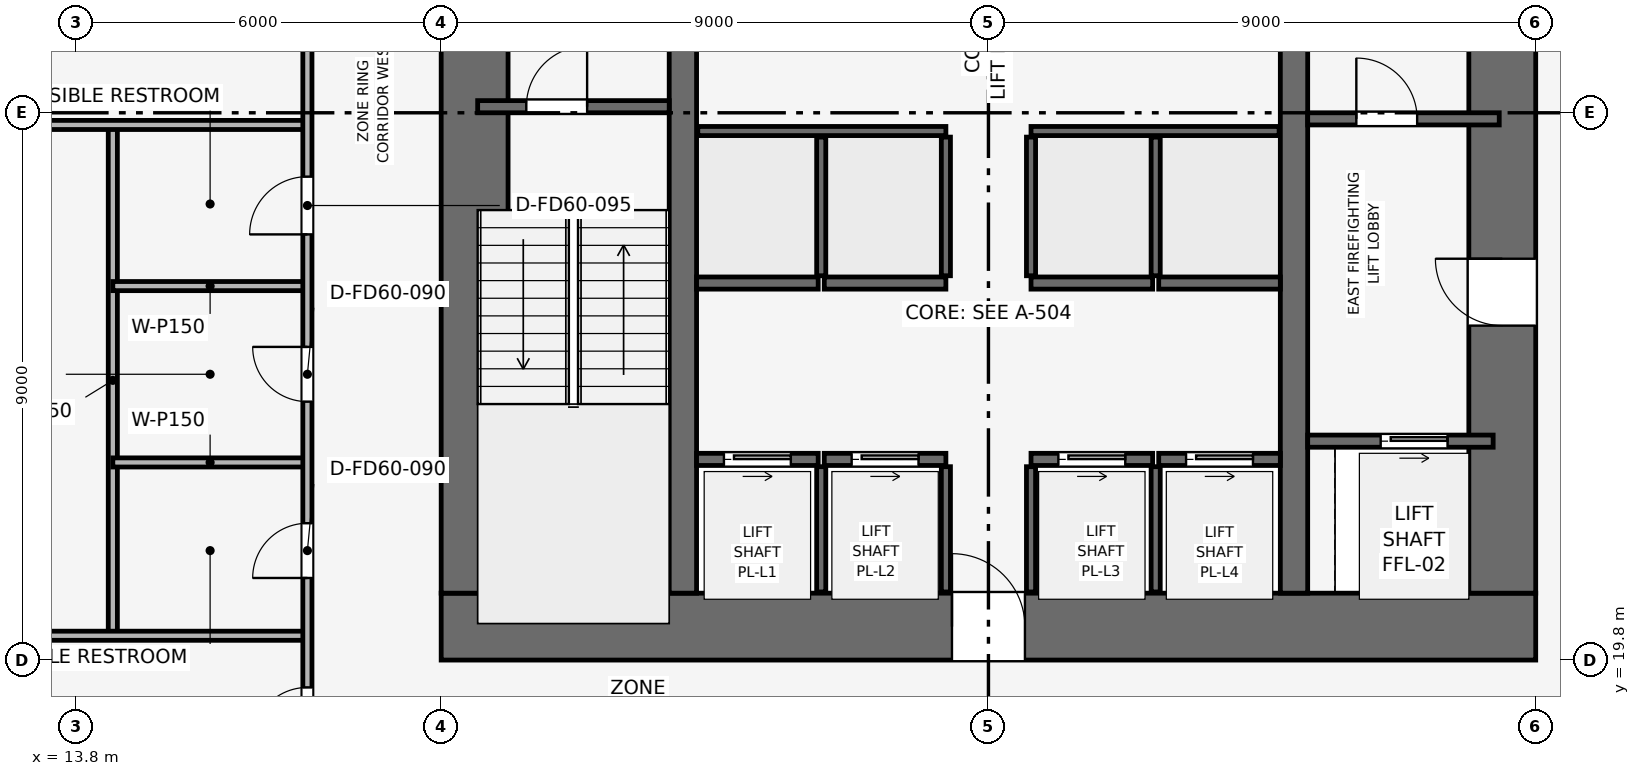
"""IFC4 building model, lengths in metres.
Left out: names, types, materials, properties, quantities, classifications, styles, units other than length and angle.
Written with IfcOpenShell. Run it as: python <this file> out.ifc"""

import sys

from ifc_helpers import new_model, si_unit, direction, frame, frame_2d, origin, place, context, subcontext, project, spatial, rectangle, extrude, element, fill, save


model = new_model("IFC4")
c1 = context("Model", 3, precision=1e-05, world=origin(), true_north=direction((0.0, 1.0)))
c2 = subcontext(c1, "Body", "Model", "MODEL_VIEW")
j1 = project(units=[si_unit("LENGTHUNIT", "METRE"), si_unit("PLANEANGLEUNIT", "RADIAN")], contexts=[c1])
p1 = place(None, origin())
s1 = spatial("IfcSite", under=j1, at=p1, CompositionType="ELEMENT")
p2 = place(p1, origin())
s2 = spatial("IfcBuilding", under=s1, at=p2, CompositionType="ELEMENT")
p3 = place(p2, frame((0.0, 0.0, 57.3)))
s3 = spatial("IfcBuildingStorey", under=s2, at=p3, CompositionType="ELEMENT", Elevation=57.3)
p4 = place(p3, frame((19.8, 20.35, 0.0), z_axis=(0.0, 0.0, 1.0), x_axis=(1.0, 0.0, 0.0)))
e1 = element("IfcWall", 1, at=p4, inside=s3, PredefinedType="SHEAR", context=c2, shape_type="SweptSolid", body=[
    extrude(rectangle(XDim=18.0, YDim=1.1, at=frame_2d((9.0, 0.0))), origin(), (0.0, 0.0, 1.0), 3.9),
])
p5 = place(p4, frame((8.4, 0.0, 0.0)))
e2 = element("IfcOpeningElement", 2, at=p5, cuts=e1, PredefinedType="OPENING", context=c2, shape_type="SweptSolid", body=[
    extrude(rectangle(XDim=1.2, YDim=2.2, at=frame_2d((0.6, 1.1))), frame((0.0, 0.56, 0.0), z_axis=(0.0, -1.0, 0.0), x_axis=(1.0, 0.0, 0.0)), (0.0, 0.0, 1.0), 1.12),
])
p6 = place(p3, frame((20.35, 20.9, 0.0), z_axis=(0.0, 0.0, 1.0), x_axis=(0.0, 1.0, 0.0)))
e3 = element("IfcWall", 3, at=p6, inside=s3, PredefinedType="SHEAR", context=c2, shape_type="SweptSolid", body=[
    extrude(rectangle(XDim=15.8, YDim=1.1, at=frame_2d((7.9, 0.0))), origin(), (0.0, 0.0, 1.0), 3.9),
])
p7 = place(p6, frame((9.9, 0.0, 0.0)))
e4 = element("IfcOpeningElement", 4, at=p7, cuts=e3, PredefinedType="OPENING", context=c2, shape_type="SweptSolid", body=[
    extrude(rectangle(XDim=1.1, YDim=2.15, at=frame_2d((0.55, 1.075))), frame((0.0, 0.56, 0.0), z_axis=(0.0, -1.0, 0.0), x_axis=(1.0, 0.0, 0.0)), (0.0, 0.0, 1.0), 1.12),
])
p8 = place(p3, frame((37.25, 20.9, 0.0), z_axis=(0.0, 0.0, 1.0), x_axis=(0.0, 1.0, 0.0)))
e5 = element("IfcWall", 5, at=p8, inside=s3, PredefinedType="SHEAR", context=c2, shape_type="SweptSolid", body=[
    extrude(rectangle(XDim=15.8, YDim=1.1, at=frame_2d((7.9, 0.0))), origin(), (0.0, 0.0, 1.0), 3.9),
])
p9 = place(p8, frame((4.4, 0.0, 0.0)))
e6 = element("IfcOpeningElement", 6, at=p9, cuts=e5, PredefinedType="OPENING", context=c2, shape_type="SweptSolid", body=[
    extrude(rectangle(XDim=1.1, YDim=2.15, at=frame_2d((0.55, 1.075))), frame((0.0, 0.56, 0.0), z_axis=(0.0, -1.0, 0.0), x_axis=(1.0, 0.0, 0.0)), (0.0, 0.0, 1.0), 1.12),
])
for number, where, z_axis, x_axis in (
    (7, (23.775, 20.9, 0.0), (0.0, 0.0, 1.0), (0.0, 1.0, 0.0)),
    (8, (33.825, 20.9, 0.0), (0.0, 0.0, 1.0), (0.0, 1.0, 0.0)),
):
    element("IfcWall", number, at=place(p3, frame(where, z_axis=z_axis, x_axis=x_axis)), inside=s3, PredefinedType="SHEAR", context=c2, shape_type="SweptSolid", body=[
        extrude(rectangle(XDim=15.8, YDim=0.45, at=frame_2d((7.9, 0.0))), origin(), (0.0, 0.0, 1.0), 3.9),
    ])
p10 = place(p3, frame((20.4, 28.9, 0.0), z_axis=(0.0, 0.0, 1.0), x_axis=(1.0, 0.0, 0.0)))
e9 = element("IfcWall", 9, at=p10, inside=s3, PredefinedType="SHEAR", context=c2, shape_type="SweptSolid", body=[
    extrude(rectangle(XDim=3.15, YDim=0.2, at=frame_2d((1.575, 0.0))), origin(), (0.0, 0.0, 1.0), 3.65),
])
p11 = place(p10, frame((0.8, 0.0, 0.0)))
e10 = element("IfcOpeningElement", 10, at=p11, cuts=e9, PredefinedType="OPENING", context=c2, shape_type="SweptSolid", body=[
    extrude(rectangle(XDim=1.0, YDim=2.1, at=frame_2d((0.5, 1.05))), frame((0.0, 0.11, 0.0), z_axis=(0.0, -1.0, 0.0), x_axis=(1.0, 0.0, 0.0)), (0.0, 0.0, 1.0), 0.22),
])
p12 = place(p3, frame((34.05, 28.7, 0.0), z_axis=(0.0, 0.0, 1.0), x_axis=(1.0, 0.0, 0.0)))
e11 = element("IfcWall", 11, at=p12, inside=s3, PredefinedType="SHEAR", context=c2, shape_type="SweptSolid", body=[
    extrude(rectangle(XDim=3.15, YDim=0.2, at=frame_2d((1.575, 0.0))), origin(), (0.0, 0.0, 1.0), 3.65),
])
p13 = place(p12, frame((0.8, 0.0, 0.0)))
e12 = element("IfcOpeningElement", 12, at=p13, cuts=e11, PredefinedType="OPENING", context=c2, shape_type="SweptSolid", body=[
    extrude(rectangle(XDim=1.0, YDim=2.1, at=frame_2d((0.5, 1.05))), frame((0.0, 0.11, 0.0), z_axis=(0.0, -1.0, 0.0), x_axis=(1.0, 0.0, 0.0)), (0.0, 0.0, 1.0), 0.22),
])
p14 = place(p3, frame((34.05, 23.4, 0.0), z_axis=(0.0, 0.0, 1.0), x_axis=(1.0, 0.0, 0.0)))
e13 = element("IfcWall", 13, at=p14, inside=s3, PredefinedType="SHEAR", context=c2, shape_type="SweptSolid", body=[
    extrude(rectangle(XDim=3.05, YDim=0.2, at=frame_2d((1.525, 0.0))), origin(), (0.0, 0.0, 1.0), 3.65),
])
p15 = place(p14, frame((1.2, 0.0, 0.0)))
e14 = element("IfcOpeningElement", 14, at=p15, cuts=e13, PredefinedType="OPENING", context=c2, shape_type="SweptSolid", body=[
    extrude(rectangle(XDim=1.1, YDim=2.15, at=frame_2d((0.55, 1.075))), frame((0.0, 0.11, 0.0), z_axis=(0.0, -1.0, 0.0), x_axis=(1.0, 0.0, 0.0)), (0.0, 0.0, 1.0), 0.22),
])
p16 = place(p3, frame((24.0, 23.1, 0.0), z_axis=(0.0, 0.0, 1.0), x_axis=(1.0, 0.0, 0.0)))
e15 = element("IfcWall", 15, at=p16, inside=s3, PredefinedType="SHEAR", context=c2, shape_type="SweptSolid", body=[
    extrude(rectangle(XDim=2.0, YDim=0.2, at=frame_2d((1.0, 0.0))), origin(), (0.0, 0.0, 1.0), 3.65),
])
p17 = place(p16, frame((0.45, 0.0, 0.0)))
e16 = element("IfcOpeningElement", 16, at=p17, cuts=e15, PredefinedType="OPENING", context=c2, shape_type="SweptSolid", body=[
    extrude(rectangle(XDim=1.1, YDim=2.15, at=frame_2d((0.55, 1.075))), frame((0.0, 0.11, 0.0), z_axis=(0.0, -1.0, 0.0), x_axis=(1.0, 0.0, 0.0)), (0.0, 0.0, 1.0), 0.22),
])
p18 = place(p3, frame((26.1, 23.1, 0.0), z_axis=(0.0, 0.0, 1.0), x_axis=(1.0, 0.0, 0.0)))
e17 = element("IfcWall", 17, at=p18, inside=s3, PredefinedType="SHEAR", context=c2, shape_type="SweptSolid", body=[
    extrude(rectangle(XDim=2.0, YDim=0.2, at=frame_2d((1.0, 0.0))), origin(), (0.0, 0.0, 1.0), 3.65),
])
p19 = place(p18, frame((0.45, 0.0, 0.0)))
e18 = element("IfcOpeningElement", 18, at=p19, cuts=e17, PredefinedType="OPENING", context=c2, shape_type="SweptSolid", body=[
    extrude(rectangle(XDim=1.1, YDim=2.15, at=frame_2d((0.55, 1.075))), frame((0.0, 0.11, 0.0), z_axis=(0.0, -1.0, 0.0), x_axis=(1.0, 0.0, 0.0)), (0.0, 0.0, 1.0), 0.22),
])
p20 = place(p3, frame((29.5, 23.1, 0.0), z_axis=(0.0, 0.0, 1.0), x_axis=(1.0, 0.0, 0.0)))
e19 = element("IfcWall", 19, at=p20, inside=s3, PredefinedType="SHEAR", context=c2, shape_type="SweptSolid", body=[
    extrude(rectangle(XDim=2.0, YDim=0.2, at=frame_2d((1.0, 0.0))), origin(), (0.0, 0.0, 1.0), 3.65),
])
p21 = place(p20, frame((0.45, 0.0, 0.0)))
e20 = element("IfcOpeningElement", 20, at=p21, cuts=e19, PredefinedType="OPENING", context=c2, shape_type="SweptSolid", body=[
    extrude(rectangle(XDim=1.1, YDim=2.15, at=frame_2d((0.55, 1.075))), frame((0.0, 0.11, 0.0), z_axis=(0.0, -1.0, 0.0), x_axis=(1.0, 0.0, 0.0)), (0.0, 0.0, 1.0), 0.22),
])
p22 = place(p3, frame((31.6, 23.1, 0.0), z_axis=(0.0, 0.0, 1.0), x_axis=(1.0, 0.0, 0.0)))
e21 = element("IfcWall", 21, at=p22, inside=s3, PredefinedType="SHEAR", context=c2, shape_type="SweptSolid", body=[
    extrude(rectangle(XDim=2.0, YDim=0.2, at=frame_2d((1.0, 0.0))), origin(), (0.0, 0.0, 1.0), 3.65),
])
p23 = place(p22, frame((0.45, 0.0, 0.0)))
e22 = element("IfcOpeningElement", 22, at=p23, cuts=e21, PredefinedType="OPENING", context=c2, shape_type="SweptSolid", body=[
    extrude(rectangle(XDim=1.1, YDim=2.15, at=frame_2d((0.55, 1.075))), frame((0.0, 0.11, 0.0), z_axis=(0.0, -1.0, 0.0), x_axis=(1.0, 0.0, 0.0)), (0.0, 0.0, 1.0), 0.22),
])
for number, where, z_axis, x_axis in (
    (23, (24.0, 26.0, 0.0), (0.0, 0.0, 1.0), (1.0, 0.0, 0.0)),
    (24, (26.1, 26.0, 0.0), (0.0, 0.0, 1.0), (1.0, 0.0, 0.0)),
    (25, (29.5, 26.0, 0.0), (0.0, 0.0, 1.0), (1.0, 0.0, 0.0)),
    (26, (31.6, 26.0, 0.0), (0.0, 0.0, 1.0), (1.0, 0.0, 0.0)),
):
    element("IfcWall", number, at=place(p3, frame(where, z_axis=z_axis, x_axis=x_axis)), inside=s3, PredefinedType="SHEAR", context=c2, shape_type="SweptSolid", body=[
        extrude(rectangle(XDim=2.0, YDim=0.2, at=frame_2d((1.0, 0.0))), origin(), (0.0, 0.0, 1.0), 3.65),
    ])
for number, where, z_axis, x_axis in (
    (27, (26.05, 20.92, 0.0), (0.0, 0.0, 1.0), (0.0, 1.0, 0.0)),
    (28, (28.1, 20.92, 0.0), (0.0, 0.0, 1.0), (0.0, 1.0, 0.0)),
    (29, (29.5, 20.92, 0.0), (0.0, 0.0, 1.0), (0.0, 1.0, 0.0)),
    (30, (31.55, 20.92, 0.0), (0.0, 0.0, 1.0), (0.0, 1.0, 0.0)),
):
    element("IfcWall", number, at=place(p3, frame(where, z_axis=z_axis, x_axis=x_axis)), inside=s3, PredefinedType="SHEAR", context=c2, shape_type="SweptSolid", body=[
        extrude(rectangle(XDim=2.06, YDim=0.15, at=frame_2d((1.03, 0.0))), origin(), (0.0, 0.0, 1.0), 3.65),
    ])
for number, where, z_axis, x_axis in (
    (31, (24.02, 28.5, 0.0), (0.0, 0.0, 1.0), (1.0, 0.0, 0.0)),
    (32, (29.5, 28.5, 0.0), (0.0, 0.0, 1.0), (1.0, 0.0, 0.0)),
):
    element("IfcWall", number, at=place(p3, frame(where, z_axis=z_axis, x_axis=x_axis)), inside=s3, PredefinedType="SHEAR", context=c2, shape_type="SweptSolid", body=[
        extrude(rectangle(XDim=4.08, YDim=0.15, at=frame_2d((2.04, 0.0))), origin(), (0.0, 0.0, 1.0), 3.65),
    ])
for number, where, z_axis, x_axis in (
    (33, (26.05, 26.12, 0.0), (0.0, 0.0, 1.0), (0.0, 1.0, 0.0)),
    (34, (28.1, 26.12, 0.0), (0.0, 0.0, 1.0), (0.0, 1.0, 0.0)),
    (35, (29.5, 26.12, 0.0), (0.0, 0.0, 1.0), (0.0, 1.0, 0.0)),
    (36, (31.55, 26.12, 0.0), (0.0, 0.0, 1.0), (0.0, 1.0, 0.0)),
):
    element("IfcWall", number, at=place(p3, frame(where, z_axis=z_axis, x_axis=x_axis)), inside=s3, PredefinedType="SHEAR", context=c2, shape_type="SweptSolid", body=[
        extrude(rectangle(XDim=2.28, YDim=0.15, at=frame_2d((1.14, 0.0))), origin(), (0.0, 0.0, 1.0), 3.65),
    ])
p24 = place(p3, frame((14.4, 20.2, 0.0), z_axis=(0.0, 0.0, 1.0), x_axis=(0.0, 1.0, 0.0)))
e37 = element("IfcWall", 37, at=p24, inside=s3, PredefinedType="PARTITIONING", context=c2, shape_type="SweptSolid", body=[
    extrude(rectangle(XDim=8.4, YDim=0.15, at=frame_2d((4.2, 0.0))), origin(), (0.0, 0.0, 1.0), 3.085),
])
p25 = place(p3, frame((1.03, 20.2, 0.0), z_axis=(0.0, 0.0, 1.0), x_axis=(1.0, 0.0, 0.0)))
e38 = element("IfcWall", 38, at=p25, inside=s3, PredefinedType="PARTITIONING", context=c2, shape_type="SweptSolid", body=[
    extrude(rectangle(XDim=16.57, YDim=0.15, at=frame_2d((8.285, 0.0))), origin(), (0.0, 0.0, 1.0), 2.935),
])
p26 = place(p25, frame((6.235, 0.0, 0.0)))
e39 = element("IfcOpeningElement", 39, at=p26, cuts=e38, PredefinedType="OPENING", context=c2, shape_type="SweptSolid", body=[
    extrude(rectangle(XDim=0.9, YDim=2.1, at=frame_2d((0.45, 1.05))), frame((0.0, 0.085, 0.0), z_axis=(0.0, -1.0, 0.0), x_axis=(1.0, 0.0, 0.0)), (0.0, 0.0, 1.0), 0.17),
])
p27 = place(p3, frame((1.03, 28.6, 0.0), z_axis=(0.0, 0.0, 1.0), x_axis=(1.0, 0.0, 0.0)))
e40 = element("IfcWall", 40, at=p27, inside=s3, PredefinedType="PARTITIONING", context=c2, shape_type="SweptSolid", body=[
    extrude(rectangle(XDim=16.57, YDim=0.15, at=frame_2d((8.285, 0.0))), origin(), (0.0, 0.0, 1.0), 2.935),
])
for number, where, z_axis, x_axis in (
    (41, (14.4, 23.05, 0.0), (0.0, 0.0, 1.0), (1.0, 0.0, 0.0)),
    (42, (14.4, 25.95, 0.0), (0.0, 0.0, 1.0), (1.0, 0.0, 0.0)),
):
    element("IfcWall", number, at=place(p3, frame(where, z_axis=z_axis, x_axis=x_axis)), inside=s3, PredefinedType="PARTITIONING", context=c2, shape_type="SweptSolid", body=[
        extrude(rectangle(XDim=3.2, YDim=0.15, at=frame_2d((1.6, 0.0))), origin(), (0.0, 0.0, 1.0), 3.65),
    ])
p28 = place(p3, frame((17.6, 17.6, 0.0), z_axis=(0.0, 0.0, 1.0), x_axis=(0.0, 1.0, 0.0)))
e43 = element("IfcWall", 43, at=p28, inside=s3, PredefinedType="PARTITIONING", context=c2, shape_type="SweptSolid", body=[
    extrude(rectangle(XDim=22.4, YDim=0.15, at=frame_2d((11.2, 0.0))), origin(), (0.0, 0.0, 1.0), 3.085),
])
p29 = place(p28, frame((0.85, 0.0, 0.0)))
e44 = element("IfcOpeningElement", 44, at=p29, cuts=e43, PredefinedType="OPENING", context=c2, shape_type="SweptSolid", body=[
    extrude(rectangle(XDim=0.9, YDim=2.1, at=frame_2d((0.45, 1.05))), frame((0.0, 0.085, 0.0), z_axis=(0.0, -1.0, 0.0), x_axis=(1.0, 0.0, 0.0)), (0.0, 0.0, 1.0), 0.17),
])
p30 = place(p28, frame((3.55, 0.0, 0.0)))
e45 = element("IfcOpeningElement", 45, at=p30, cuts=e43, PredefinedType="OPENING", context=c2, shape_type="SweptSolid", body=[
    extrude(rectangle(XDim=0.9, YDim=2.1, at=frame_2d((0.45, 1.05))), frame((0.0, 0.085, 0.0), z_axis=(0.0, -1.0, 0.0), x_axis=(1.0, 0.0, 0.0)), (0.0, 0.0, 1.0), 0.17),
])
p31 = place(p28, frame((6.45, 0.0, 0.0)))
e46 = element("IfcOpeningElement", 46, at=p31, cuts=e43, PredefinedType="OPENING", context=c2, shape_type="SweptSolid", body=[
    extrude(rectangle(XDim=0.9, YDim=2.1, at=frame_2d((0.45, 1.05))), frame((0.0, 0.085, 0.0), z_axis=(0.0, -1.0, 0.0), x_axis=(1.0, 0.0, 0.0)), (0.0, 0.0, 1.0), 0.17),
])
p32 = place(p28, frame((9.2, 0.0, 0.0)))
e47 = element("IfcOpeningElement", 47, at=p32, cuts=e43, PredefinedType="OPENING", context=c2, shape_type="SweptSolid", body=[
    extrude(rectangle(XDim=0.95, YDim=2.1, at=frame_2d((0.475, 1.05))), frame((0.0, 0.085, 0.0), z_axis=(0.0, -1.0, 0.0), x_axis=(1.0, 0.0, 0.0)), (0.0, 0.0, 1.0), 0.17),
])
p33 = place(p28, frame((16.25, 0.0, 0.0)))
e48 = element("IfcOpeningElement", 48, at=p33, cuts=e43, PredefinedType="OPENING", context=c2, shape_type="SweptSolid", body=[
    extrude(rectangle(XDim=0.9, YDim=2.1, at=frame_2d((0.45, 1.05))), frame((0.0, 0.085, 0.0), z_axis=(0.0, -1.0, 0.0), x_axis=(1.0, 0.0, 0.0)), (0.0, 0.0, 1.0), 0.17),
])
p34 = place(p11, origin())
e49 = element("IfcDoor", 49, at=p34, inside=s3, OperationType="SINGLE_SWING_RIGHT", PredefinedType="DOOR", context=c2, shape_type="SweptSolid", body=[
    extrude(rectangle(XDim=1.0, YDim=2.1, at=frame_2d((0.5, 1.05))), frame((0.0, 0.025, 0.0), z_axis=(0.0, -1.0, 0.0), x_axis=(1.0, 0.0, 0.0)), (0.0, 0.0, 1.0), 0.05),
])
fill(e10, e49)
p35 = place(p13, origin())
e50 = element("IfcDoor", 50, at=p35, inside=s3, OperationType="SINGLE_SWING_LEFT", PredefinedType="DOOR", context=c2, shape_type="SweptSolid", body=[
    extrude(rectangle(XDim=1.0, YDim=2.1, at=frame_2d((0.5, 1.05))), frame((0.0, 0.025, 0.0), z_axis=(0.0, -1.0, 0.0), x_axis=(1.0, 0.0, 0.0)), (0.0, 0.0, 1.0), 0.05),
])
fill(e12, e50)
p36 = place(p15, origin())
e51 = element("IfcDoor", 51, at=p36, inside=s3, OperationType="SLIDING_TO_RIGHT", PredefinedType="DOOR", context=c2, shape_type="SweptSolid", body=[
    extrude(rectangle(XDim=1.1, YDim=2.15, at=frame_2d((0.55, 1.075))), frame((0.0, 0.025, 0.0), z_axis=(0.0, -1.0, 0.0), x_axis=(1.0, 0.0, 0.0)), (0.0, 0.0, 1.0), 0.05),
])
fill(e14, e51)
p37 = place(p17, origin())
e52 = element("IfcDoor", 52, at=p37, inside=s3, OperationType="SLIDING_TO_RIGHT", PredefinedType="DOOR", context=c2, shape_type="SweptSolid", body=[
    extrude(rectangle(XDim=1.1, YDim=2.15, at=frame_2d((0.55, 1.075))), frame((0.0, 0.025, 0.0), z_axis=(0.0, -1.0, 0.0), x_axis=(1.0, 0.0, 0.0)), (0.0, 0.0, 1.0), 0.05),
])
fill(e16, e52)
p38 = place(p19, origin())
e53 = element("IfcDoor", 53, at=p38, inside=s3, OperationType="SLIDING_TO_RIGHT", PredefinedType="DOOR", context=c2, shape_type="SweptSolid", body=[
    extrude(rectangle(XDim=1.1, YDim=2.15, at=frame_2d((0.55, 1.075))), frame((0.0, 0.025, 0.0), z_axis=(0.0, -1.0, 0.0), x_axis=(1.0, 0.0, 0.0)), (0.0, 0.0, 1.0), 0.05),
])
fill(e18, e53)
p39 = place(p21, origin())
e54 = element("IfcDoor", 54, at=p39, inside=s3, OperationType="SLIDING_TO_RIGHT", PredefinedType="DOOR", context=c2, shape_type="SweptSolid", body=[
    extrude(rectangle(XDim=1.1, YDim=2.15, at=frame_2d((0.55, 1.075))), frame((0.0, 0.025, 0.0), z_axis=(0.0, -1.0, 0.0), x_axis=(1.0, 0.0, 0.0)), (0.0, 0.0, 1.0), 0.05),
])
fill(e20, e54)
p40 = place(p23, origin())
e55 = element("IfcDoor", 55, at=p40, inside=s3, OperationType="SLIDING_TO_RIGHT", PredefinedType="DOOR", context=c2, shape_type="SweptSolid", body=[
    extrude(rectangle(XDim=1.1, YDim=2.15, at=frame_2d((0.55, 1.075))), frame((0.0, 0.025, 0.0), z_axis=(0.0, -1.0, 0.0), x_axis=(1.0, 0.0, 0.0)), (0.0, 0.0, 1.0), 0.05),
])
fill(e22, e55)
p41 = place(p29, origin())
e56 = element("IfcDoor", 56, at=p41, inside=s3, OperationType="SINGLE_SWING_LEFT", PredefinedType="DOOR", context=c2, shape_type="SweptSolid", body=[
    extrude(rectangle(XDim=0.9, YDim=2.1, at=frame_2d((0.45, 1.05))), frame((0.0, 0.025, 0.0), z_axis=(0.0, -1.0, 0.0), x_axis=(1.0, 0.0, 0.0)), (0.0, 0.0, 1.0), 0.05),
])
fill(e44, e56)
p42 = place(p30, origin())
e57 = element("IfcDoor", 57, at=p42, inside=s3, OperationType="SINGLE_SWING_LEFT", PredefinedType="DOOR", context=c2, shape_type="SweptSolid", body=[
    extrude(rectangle(XDim=0.9, YDim=2.1, at=frame_2d((0.45, 1.05))), frame((0.0, 0.025, 0.0), z_axis=(0.0, -1.0, 0.0), x_axis=(1.0, 0.0, 0.0)), (0.0, 0.0, 1.0), 0.05),
])
fill(e45, e57)
p43 = place(p31, origin())
e58 = element("IfcDoor", 58, at=p43, inside=s3, OperationType="SINGLE_SWING_RIGHT", PredefinedType="DOOR", context=c2, shape_type="SweptSolid", body=[
    extrude(rectangle(XDim=0.9, YDim=2.1, at=frame_2d((0.45, 1.05))), frame((0.0, 0.025, 0.0), z_axis=(0.0, -1.0, 0.0), x_axis=(1.0, 0.0, 0.0)), (0.0, 0.0, 1.0), 0.05),
])
fill(e46, e58)
p44 = place(p32, origin())
e59 = element("IfcDoor", 59, at=p44, inside=s3, OperationType="SINGLE_SWING_LEFT", PredefinedType="DOOR", context=c2, shape_type="SweptSolid", body=[
    extrude(rectangle(XDim=0.95, YDim=2.1, at=frame_2d((0.475, 1.05))), frame((0.0, 0.025, 0.0), z_axis=(0.0, -1.0, 0.0), x_axis=(1.0, 0.0, 0.0)), (0.0, 0.0, 1.0), 0.05),
])
fill(e47, e59)
p45 = place(p9, origin())
e60 = element("IfcDoor", 60, at=p45, inside=s3, OperationType="SINGLE_SWING_RIGHT", PredefinedType="DOOR", context=c2, shape_type="SweptSolid", body=[
    extrude(rectangle(XDim=1.1, YDim=2.15, at=frame_2d((0.55, 1.075))), frame((0.0, 0.025, 0.0), z_axis=(0.0, -1.0, 0.0), x_axis=(1.0, 0.0, 0.0)), (0.0, 0.0, 1.0), 0.05),
])
fill(e6, e60)
p46 = place(p5, origin())
e61 = element("IfcDoor", 61, at=p46, inside=s3, OperationType="SINGLE_SWING_LEFT", PredefinedType="DOOR", context=c2, shape_type="SweptSolid", body=[
    extrude(rectangle(XDim=1.2, YDim=2.2, at=frame_2d((0.6, 1.1))), frame((0.0, 0.025, 0.0), z_axis=(0.0, -1.0, 0.0), x_axis=(1.0, 0.0, 0.0)), (0.0, 0.0, 1.0), 0.05),
])
fill(e2, e61)
save(model, sys.argv[1])
